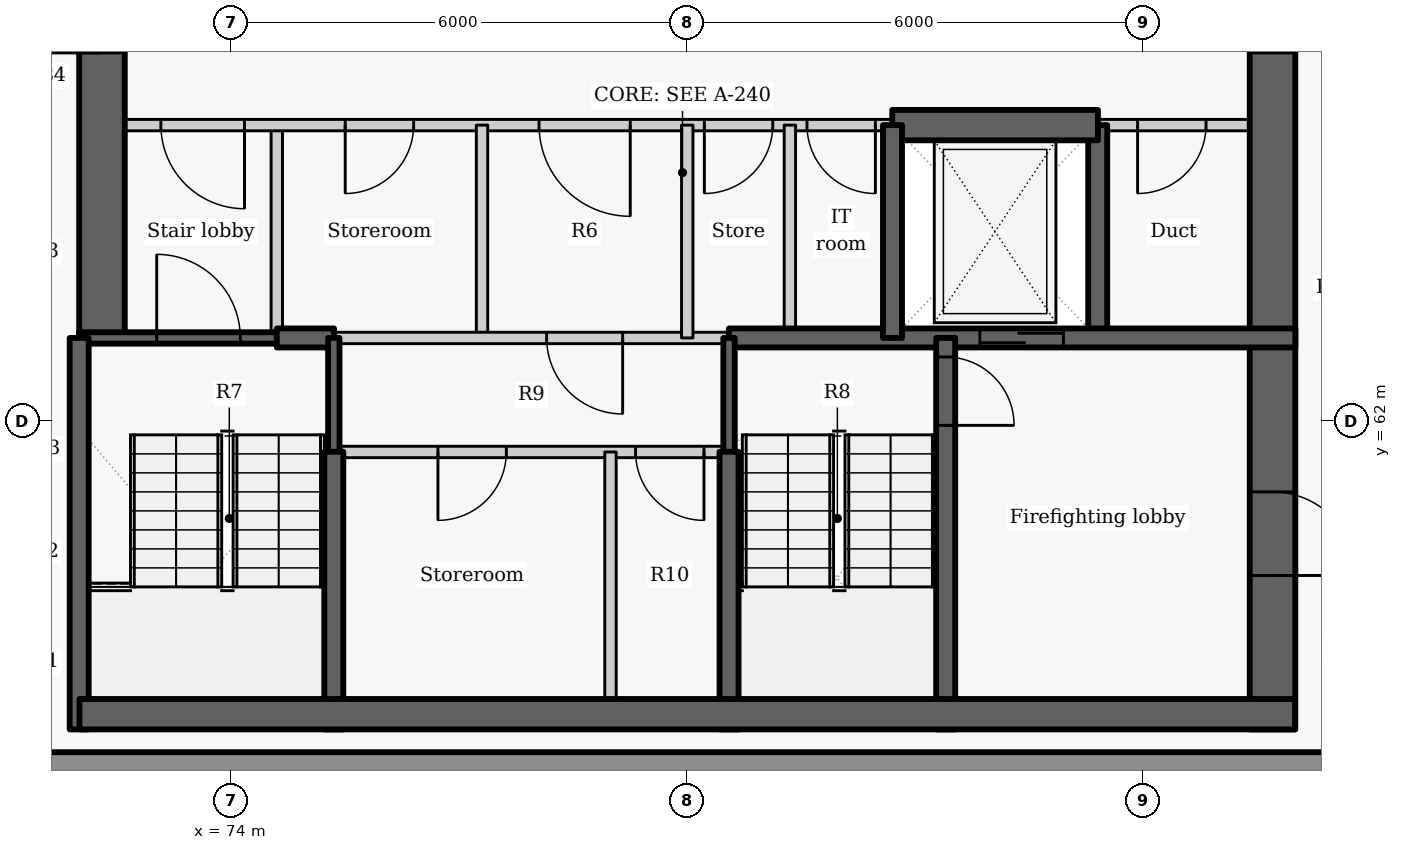
"""IFC4 building model, lengths in metres.
Left out: names, types, materials, properties, quantities, classifications, styles, units other than length and angle.
Written with IfcOpenShell. Run it as: python <this file> out.ifc"""

import sys

from ifc_helpers import new_model, si_unit, direction, frame, frame_2d, origin, place, context, subcontext, project, spatial, rectangle, extrude, element, fill, save


model = new_model("IFC4")
c1 = context("Model", 3, precision=1e-05, world=origin(), true_north=direction((0.0, 1.0)))
c2 = subcontext(c1, "Body", "Model", "MODEL_VIEW")
j1 = project(units=[si_unit("LENGTHUNIT", "METRE"), si_unit("PLANEANGLEUNIT", "RADIAN")], contexts=[c1])
p1 = place(None, origin())
s1 = spatial("IfcSite", under=j1, at=p1, CompositionType="ELEMENT")
p2 = place(p1, origin())
s2 = spatial("IfcBuilding", under=s1, at=p2, CompositionType="ELEMENT")
p3 = place(p2, frame((0.0, 0.0, 229.5)))
s3 = spatial("IfcBuildingStorey", under=s2, at=p3, CompositionType="ELEMENT", Elevation=229.5)
p4 = place(p3, frame((70.501, 57.5, 0.0), z_axis=(0.0, 0.0, 1.0), x_axis=(1.0, 0.0, 0.0)))
e1 = element("IfcWall", 1, at=p4, inside=s3, PredefinedType="SOLIDWALL", context=c2, shape_type="SweptSolid", body=[
    extrude(rectangle(XDim=18.993, YDim=0.3, at=frame_2d((9.496, 0.0))), origin(), (0.0, 0.0, 1.0), 2.425),
])
p5 = place(p3, frame((74.6, 63.1, 0.0), z_axis=(0.0, 0.0, 1.0), x_axis=(0.0, 1.0, 0.0)))
e2 = element("IfcWall", 2, at=p5, inside=s3, PredefinedType="PARTITIONING", context=c2, shape_type="SweptSolid", body=[
    extrude(rectangle(XDim=2.8, YDim=0.15, at=frame_2d((1.4, 0.0))), origin(), (0.0, 0.0, 1.0), 3.025),
])
p6 = place(p3, frame((72.3, 63.1, -0.275), z_axis=(0.0, 0.0, 1.0), x_axis=(0.0, 1.0, 0.0)))
e3 = element("IfcWall", 3, at=p6, inside=s3, PredefinedType="SHEAR", context=c2, shape_type="SweptSolid", body=[
    extrude(rectangle(XDim=9.1, YDim=0.6, at=frame_2d((4.55, 0.0))), origin(), (0.0, 0.0, 1.0), 3.3),
])
p7 = place(p6, frame((3.75, 0.0, 0.275)))
e4 = element("IfcOpeningElement", 4, at=p7, cuts=e3, PredefinedType="OPENING", context=c2, shape_type="SweptSolid", body=[
    extrude(rectangle(XDim=1.5, YDim=2.1, at=frame_2d((0.75, 1.05))), frame((0.0, 0.31, 0.0), z_axis=(0.0, -1.0, 0.0), x_axis=(1.0, 0.0, 0.0)), (0.0, 0.0, 1.0), 0.62),
])
p8 = place(p3, frame((85.4, 63.1, -0.275), z_axis=(0.0, 0.0, 1.0), x_axis=(0.0, 1.0, 0.0)))
e5 = element("IfcWall", 5, at=p8, inside=s3, PredefinedType="SHEAR", context=c2, shape_type="SweptSolid", body=[
    extrude(rectangle(XDim=2.8, YDim=0.25, at=frame_2d((1.4, 0.0))), origin(), (0.0, 0.0, 1.0), 3.3),
])
p9 = place(p3, frame((87.7, 72.2, -0.275), z_axis=(0.0, 0.0, 1.0), x_axis=(0.0, -1.0, 0.0)))
e6 = element("IfcWall", 6, at=p9, inside=s3, PredefinedType="SHEAR", context=c2, shape_type="SweptSolid", body=[
    extrude(rectangle(XDim=14.25, YDim=0.6, at=frame_2d((7.125, 0.0))), origin(), (0.0, 0.0, 1.0), 3.3),
])
p10 = place(p9, frame((3.85, 0.0, 0.275)))
e7 = element("IfcOpeningElement", 7, at=p10, cuts=e6, PredefinedType="OPENING", context=c2, shape_type="SweptSolid", body=[
    extrude(rectangle(XDim=1.5, YDim=2.1, at=frame_2d((0.75, 1.05))), frame((0.0, 0.31, 0.0), z_axis=(0.0, -1.0, 0.0), x_axis=(1.0, 0.0, 0.0)), (0.0, 0.0, 1.0), 0.62),
])
p11 = place(p9, frame((11.125, 0.0, 0.275)))
e8 = element("IfcOpeningElement", 8, at=p11, cuts=e6, PredefinedType="OPENING", context=c2, shape_type="SweptSolid", body=[
    extrude(rectangle(XDim=1.1, YDim=2.1, at=frame_2d((0.55, 1.05))), frame((0.0, 0.31, 0.0), z_axis=(0.0, -1.0, 0.0), x_axis=(1.0, 0.0, 0.0)), (0.0, 0.0, 1.0), 0.62),
])
p12 = place(p3, frame((82.703, 65.9, 0.0), z_axis=(0.0, 0.0, 1.0), x_axis=(-1.0, 0.0, 0.0)))
e9 = element("IfcWall", 9, at=p12, inside=s3, PredefinedType="PARTITIONING", context=c2, shape_type="SweptSolid", body=[
    extrude(rectangle(XDim=10.703, YDim=0.15, at=frame_2d((5.352, 0.0))), origin(), (0.0, 0.0, 1.0), 3.025),
])
p13 = place(p12, frame((8.528, 0.0, 0.0)))
e10 = element("IfcOpeningElement", 10, at=p13, cuts=e9, PredefinedType="OPENING", context=c2, shape_type="SweptSolid", body=[
    extrude(rectangle(XDim=1.1, YDim=2.1, at=frame_2d((0.55, 1.05))), frame((0.0, 0.085, 0.0), z_axis=(0.0, -1.0, 0.0), x_axis=(1.0, 0.0, 0.0)), (0.0, 0.0, 1.0), 0.17),
])
p14 = place(p12, frame((6.303, 0.0, 0.0)))
e11 = element("IfcOpeningElement", 11, at=p14, cuts=e9, PredefinedType="OPENING", context=c2, shape_type="SweptSolid", body=[
    extrude(rectangle(XDim=0.9, YDim=2.1, at=frame_2d((0.45, 1.05))), frame((0.0, 0.085, 0.0), z_axis=(0.0, -1.0, 0.0), x_axis=(1.0, 0.0, 0.0)), (0.0, 0.0, 1.0), 0.17),
])
p15 = place(p12, frame((3.453, 0.0, 0.0)))
e12 = element("IfcOpeningElement", 12, at=p15, cuts=e9, PredefinedType="OPENING", context=c2, shape_type="SweptSolid", body=[
    extrude(rectangle(XDim=1.2, YDim=2.1, at=frame_2d((0.6, 1.05))), frame((0.0, 0.085, 0.0), z_axis=(0.0, -1.0, 0.0), x_axis=(1.0, 0.0, 0.0)), (0.0, 0.0, 1.0), 0.17),
])
p16 = place(p12, frame((1.578, 0.0, 0.0)))
e13 = element("IfcOpeningElement", 13, at=p16, cuts=e9, PredefinedType="OPENING", context=c2, shape_type="SweptSolid", body=[
    extrude(rectangle(XDim=0.9, YDim=2.1, at=frame_2d((0.45, 1.05))), frame((0.0, 0.085, 0.0), z_axis=(0.0, -1.0, 0.0), x_axis=(1.0, 0.0, 0.0)), (0.0, 0.0, 1.0), 0.17),
])
p17 = place(p12, frame((0.228, 0.0, 0.0)))
e14 = element("IfcOpeningElement", 14, at=p17, cuts=e9, PredefinedType="OPENING", context=c2, shape_type="SweptSolid", body=[
    extrude(rectangle(XDim=0.9, YDim=2.1, at=frame_2d((0.45, 1.05))), frame((0.0, 0.085, 0.0), z_axis=(0.0, -1.0, 0.0), x_axis=(1.0, 0.0, 0.0)), (0.0, 0.0, 1.0), 0.17),
])
p18 = place(p3, frame((88.0, 65.9, 0.0), z_axis=(0.0, 0.0, 1.0), x_axis=(-1.0, 0.0, 0.0)))
e15 = element("IfcWall", 15, at=p18, inside=s3, PredefinedType="PARTITIONING", context=c2, shape_type="SweptSolid", body=[
    extrude(rectangle(XDim=2.603, YDim=0.15, at=frame_2d((1.302, 0.0))), origin(), (0.0, 0.0, 1.0), 3.025),
])
p19 = place(p18, frame((1.175, 0.0, 0.0)))
e16 = element("IfcOpeningElement", 16, at=p19, cuts=e15, PredefinedType="OPENING", context=c2, shape_type="SweptSolid", body=[
    extrude(rectangle(XDim=0.9, YDim=2.1, at=frame_2d((0.45, 1.05))), frame((0.0, 0.085, 0.0), z_axis=(0.0, -1.0, 0.0), x_axis=(1.0, 0.0, 0.0)), (0.0, 0.0, 1.0), 0.17),
])
p20 = place(p3, frame((82.697, 65.9, -0.275), z_axis=(0.0, 0.0, 1.0), x_axis=(1.0, 0.0, 0.0)))
e17 = element("IfcWall", 17, at=p20, inside=s3, PredefinedType="SHEAR", context=c2, shape_type="SweptSolid", body=[
    extrude(rectangle(XDim=2.706, YDim=0.4, at=frame_2d((1.353, 0.0))), origin(), (0.0, 0.0, 1.0), 3.3),
])
p21 = place(p3, frame((72.0, 63.1, -0.275), z_axis=(0.0, 0.0, 1.0), x_axis=(1.0, 0.0, 0.0)))
e18 = element("IfcWall", 18, at=p21, inside=s3, PredefinedType="SHEAR", context=c2, shape_type="SweptSolid", body=[
    extrude(rectangle(XDim=2.6, YDim=0.15, at=frame_2d((1.3, 0.0))), origin(), (0.0, 0.0, 1.0), 3.3),
])
p22 = place(p21, frame((1.02, 0.0, 0.275)))
e19 = element("IfcOpeningElement", 19, at=p22, cuts=e18, PredefinedType="OPENING", context=c2, shape_type="SweptSolid", body=[
    extrude(rectangle(XDim=1.1, YDim=2.1, at=frame_2d((0.55, 1.05))), frame((0.0, 0.085, 0.0), z_axis=(0.0, -1.0, 0.0), x_axis=(1.0, 0.0, 0.0)), (0.0, 0.0, 1.0), 0.17),
])
p23 = place(p3, frame((77.3, 63.1, 0.0), z_axis=(0.0, 0.0, 1.0), x_axis=(0.0, 1.0, 0.0)))
e20 = element("IfcWall", 20, at=p23, inside=s3, PredefinedType="PARTITIONING", context=c2, shape_type="SweptSolid", body=[
    extrude(rectangle(XDim=2.8, YDim=0.15, at=frame_2d((1.4, 0.0))), origin(), (0.0, 0.0, 1.0), 3.025),
])
p24 = place(p3, frame((74.6, 63.1, -0.275), z_axis=(0.0, 0.0, 1.0), x_axis=(1.0, 0.0, 0.0)))
e21 = element("IfcWall", 21, at=p24, inside=s3, PredefinedType="SHEAR", context=c2, shape_type="SweptSolid", body=[
    extrude(rectangle(XDim=0.753, YDim=0.25, at=frame_2d((0.376, 0.0))), origin(), (0.0, 0.0, 1.0), 3.3),
])
p25 = place(p3, frame((80.547, 63.1, -0.275), z_axis=(0.0, 0.0, 1.0), x_axis=(1.0, 0.0, 0.0)))
e22 = element("IfcWall", 22, at=p25, inside=s3, PredefinedType="SHEAR", context=c2, shape_type="SweptSolid", body=[
    extrude(rectangle(XDim=7.453, YDim=0.25, at=frame_2d((3.727, 0.0))), origin(), (0.0, 0.0, 1.0), 3.3),
])
p26 = place(p25, frame((3.302, 0.0, 0.275)))
e23 = element("IfcOpeningElement", 23, at=p26, cuts=e22, PredefinedType="OPENING", context=c2, shape_type="SweptSolid", body=[
    extrude(rectangle(XDim=1.1, YDim=2.1, at=frame_2d((0.55, 1.05))), frame((0.0, 0.135, 0.0), z_axis=(0.0, -1.0, 0.0), x_axis=(1.0, 0.0, 0.0)), (0.0, 0.0, 1.0), 0.27),
])
p27 = place(p3, frame((80.553, 63.1, 0.0), z_axis=(0.0, 0.0, 1.0), x_axis=(-1.0, 0.0, 0.0)))
e24 = element("IfcWall", 24, at=p27, inside=s3, PredefinedType="PARTITIONING", context=c2, shape_type="SweptSolid", body=[
    extrude(rectangle(XDim=5.206, YDim=0.15, at=frame_2d((2.603, 0.0))), origin(), (0.0, 0.0, 1.0), 3.025),
])
p28 = place(p27, frame((1.403, 0.0, 0.0)))
e25 = element("IfcOpeningElement", 25, at=p28, cuts=e24, PredefinedType="OPENING", context=c2, shape_type="SweptSolid", body=[
    extrude(rectangle(XDim=1.0, YDim=2.1, at=frame_2d((0.5, 1.05))), frame((0.0, 0.085, 0.0), z_axis=(0.0, -1.0, 0.0), x_axis=(1.0, 0.0, 0.0)), (0.0, 0.0, 1.0), 0.17),
])
for number, where, z_axis, x_axis in (
    (26, (80.0, 63.1, 0.0), (0.0, 0.0, 1.0), (0.0, 1.0, 0.0)),
    (27, (81.35, 63.1, 0.0), (0.0, 0.0, 1.0), (0.0, 1.0, 0.0)),
):
    element("IfcWall", number, at=place(p3, frame(where, z_axis=z_axis, x_axis=x_axis)), inside=s3, PredefinedType="PARTITIONING", context=c2, shape_type="SweptSolid", body=[
        extrude(rectangle(XDim=2.8, YDim=0.15, at=frame_2d((1.4, 0.0))), origin(), (0.0, 0.0, 1.0), 3.025),
    ])
p29 = place(p3, frame((82.7, 63.1, -0.275), z_axis=(0.0, 0.0, 1.0), x_axis=(0.0, 1.0, 0.0)))
e28 = element("IfcWall", 28, at=p29, inside=s3, PredefinedType="SHEAR", context=c2, shape_type="SweptSolid", body=[
    extrude(rectangle(XDim=2.8, YDim=0.25, at=frame_2d((1.4, 0.0))), origin(), (0.0, 0.0, 1.0), 3.3),
])
p30 = place(p3, frame((75.35, 61.597, -0.275), z_axis=(0.0, 0.0, 1.0), x_axis=(0.0, 1.0, 0.0)))
e29 = element("IfcWall", 29, at=p30, inside=s3, PredefinedType="SHEAR", context=c2, shape_type="SweptSolid", body=[
    extrude(rectangle(XDim=1.503, YDim=0.15, at=frame_2d((0.751, 0.0))), origin(), (0.0, 0.0, 1.0), 3.3),
])
p31 = place(p3, frame((75.35, 57.95, -0.275), z_axis=(0.0, 0.0, 1.0), x_axis=(0.0, 1.0, 0.0)))
e30 = element("IfcWall", 30, at=p31, inside=s3, PredefinedType="SHEAR", context=c2, shape_type="SweptSolid", body=[
    extrude(rectangle(XDim=3.653, YDim=0.25, at=frame_2d((1.827, 0.0))), origin(), (0.0, 0.0, 1.0), 3.3),
])
p32 = place(p3, frame((72.0, 57.95, -0.275), z_axis=(0.0, 0.0, 1.0), x_axis=(0.0, 1.0, 0.0)))
e31 = element("IfcWall", 31, at=p32, inside=s3, PredefinedType="SHEAR", context=c2, shape_type="SweptSolid", body=[
    extrude(rectangle(XDim=5.15, YDim=0.25, at=frame_2d((2.575, 0.0))), origin(), (0.0, 0.0, 1.0), 3.3),
])
p33 = place(p3, frame((83.4, 63.1, -0.275), z_axis=(0.0, 0.0, 1.0), x_axis=(0.0, -1.0, 0.0)))
e32 = element("IfcWall", 32, at=p33, inside=s3, PredefinedType="SHEAR", context=c2, shape_type="SweptSolid", body=[
    extrude(rectangle(XDim=5.15, YDim=0.25, at=frame_2d((2.575, 0.0))), origin(), (0.0, 0.0, 1.0), 3.3),
])
p34 = place(p33, frame((0.25, 0.0, 0.275)))
e33 = element("IfcOpeningElement", 33, at=p34, cuts=e32, PredefinedType="OPENING", context=c2, shape_type="SweptSolid", body=[
    extrude(rectangle(XDim=0.9, YDim=2.1, at=frame_2d((0.45, 1.05))), frame((0.0, 0.135, 0.0), z_axis=(0.0, -1.0, 0.0), x_axis=(1.0, 0.0, 0.0)), (0.0, 0.0, 1.0), 0.27),
])
p35 = place(p3, frame((80.55, 61.597, -0.275), z_axis=(0.0, 0.0, 1.0), x_axis=(0.0, 1.0, 0.0)))
e34 = element("IfcWall", 34, at=p35, inside=s3, PredefinedType="SHEAR", context=c2, shape_type="SweptSolid", body=[
    extrude(rectangle(XDim=1.503, YDim=0.15, at=frame_2d((0.751, 0.0))), origin(), (0.0, 0.0, 1.0), 3.3),
])
p36 = place(p3, frame((80.55, 57.95, -0.275), z_axis=(0.0, 0.0, 1.0), x_axis=(0.0, 1.0, 0.0)))
e35 = element("IfcWall", 35, at=p36, inside=s3, PredefinedType="SHEAR", context=c2, shape_type="SweptSolid", body=[
    extrude(rectangle(XDim=3.653, YDim=0.25, at=frame_2d((1.827, 0.0))), origin(), (0.0, 0.0, 1.0), 3.3),
])
p37 = place(p3, frame((80.55, 61.6, 0.0), z_axis=(0.0, 0.0, 1.0), x_axis=(-1.0, 0.0, 0.0)))
e36 = element("IfcWall", 36, at=p37, inside=s3, PredefinedType="PARTITIONING", context=c2, shape_type="SweptSolid", body=[
    extrude(rectangle(XDim=5.2, YDim=0.15, at=frame_2d((2.6, 0.0))), origin(), (0.0, 0.0, 1.0), 3.025),
])
p38 = place(p37, frame((2.93, 0.0, 0.0)))
e37 = element("IfcOpeningElement", 37, at=p38, cuts=e36, PredefinedType="OPENING", context=c2, shape_type="SweptSolid", body=[
    extrude(rectangle(XDim=0.9, YDim=2.1, at=frame_2d((0.45, 1.05))), frame((0.0, 0.085, 0.0), z_axis=(0.0, -1.0, 0.0), x_axis=(1.0, 0.0, 0.0)), (0.0, 0.0, 1.0), 0.17),
])
p39 = place(p37, frame((0.33, 0.0, 0.0)))
e38 = element("IfcOpeningElement", 38, at=p39, cuts=e36, PredefinedType="OPENING", context=c2, shape_type="SweptSolid", body=[
    extrude(rectangle(XDim=0.9, YDim=2.1, at=frame_2d((0.45, 1.05))), frame((0.0, 0.085, 0.0), z_axis=(0.0, -1.0, 0.0), x_axis=(1.0, 0.0, 0.0)), (0.0, 0.0, 1.0), 0.17),
])
p40 = place(p3, frame((78.99, 57.95, 0.0), z_axis=(0.0, 0.0, 1.0), x_axis=(0.0, 1.0, 0.0)))
e39 = element("IfcWall", 39, at=p40, inside=s3, PredefinedType="PARTITIONING", context=c2, shape_type="SweptSolid", body=[
    extrude(rectangle(XDim=3.65, YDim=0.15, at=frame_2d((1.825, 0.0))), origin(), (0.0, 0.0, 1.0), 3.025),
])
p41 = place(p3, frame((72.004, 58.15, -0.275), z_axis=(0.0, 0.0, 1.0), x_axis=(1.0, 0.0, 0.0)))
e40 = element("IfcWall", 40, at=p41, inside=s3, PredefinedType="SHEAR", context=c2, shape_type="SweptSolid", body=[
    extrude(rectangle(XDim=15.992, YDim=0.4, at=frame_2d((7.996, 0.0))), origin(), (0.0, 0.0, 1.0), 3.3),
])
p42 = place(p13, origin())
e41 = element("IfcDoor", 41, at=p42, inside=s3, OperationType="SINGLE_SWING_LEFT", PredefinedType="DOOR", context=c2, shape_type="SweptSolid", body=[
    extrude(rectangle(XDim=1.1, YDim=2.1, at=frame_2d((0.55, 1.05))), frame((0.0, 0.025, 0.0), z_axis=(0.0, -1.0, 0.0), x_axis=(1.0, 0.0, 0.0)), (0.0, 0.0, 1.0), 0.05),
])
fill(e10, e41)
p43 = place(p14, origin())
e42 = element("IfcDoor", 42, at=p43, inside=s3, OperationType="SINGLE_SWING_RIGHT", PredefinedType="DOOR", context=c2, shape_type="SweptSolid", body=[
    extrude(rectangle(XDim=0.9, YDim=2.1, at=frame_2d((0.45, 1.05))), frame((0.0, 0.025, 0.0), z_axis=(0.0, -1.0, 0.0), x_axis=(1.0, 0.0, 0.0)), (0.0, 0.0, 1.0), 0.05),
])
fill(e11, e42)
p44 = place(p15, origin())
e43 = element("IfcDoor", 43, at=p44, inside=s3, OperationType="DOUBLE_DOOR_SINGLE_SWING", PredefinedType="DOOR", context=c2, shape_type="SweptSolid", body=[
    extrude(rectangle(XDim=1.2, YDim=2.1, at=frame_2d((0.6, 1.05))), frame((0.0, 0.025, 0.0), z_axis=(0.0, -1.0, 0.0), x_axis=(1.0, 0.0, 0.0)), (0.0, 0.0, 1.0), 0.05),
])
fill(e12, e43)
p45 = place(p16, origin())
e44 = element("IfcDoor", 44, at=p45, inside=s3, OperationType="SINGLE_SWING_RIGHT", PredefinedType="DOOR", context=c2, shape_type="SweptSolid", body=[
    extrude(rectangle(XDim=0.9, YDim=2.1, at=frame_2d((0.45, 1.05))), frame((0.0, 0.025, 0.0), z_axis=(0.0, -1.0, 0.0), x_axis=(1.0, 0.0, 0.0)), (0.0, 0.0, 1.0), 0.05),
])
fill(e13, e44)
p46 = place(p17, origin())
e45 = element("IfcDoor", 45, at=p46, inside=s3, OperationType="SINGLE_SWING_LEFT", PredefinedType="DOOR", context=c2, shape_type="SweptSolid", body=[
    extrude(rectangle(XDim=0.9, YDim=2.1, at=frame_2d((0.45, 1.05))), frame((0.0, 0.025, 0.0), z_axis=(0.0, -1.0, 0.0), x_axis=(1.0, 0.0, 0.0)), (0.0, 0.0, 1.0), 0.05),
])
fill(e14, e45)
p47 = place(p26, origin())
e46 = element("IfcDoor", 46, at=p47, inside=s3, OperationType="SLIDING_TO_LEFT", PredefinedType="DOOR", context=c2, shape_type="SweptSolid", body=[
    extrude(rectangle(XDim=1.1, YDim=2.1, at=frame_2d((0.55, 1.05))), frame((0.0, 0.025, 0.0), z_axis=(0.0, -1.0, 0.0), x_axis=(1.0, 0.0, 0.0)), (0.0, 0.0, 1.0), 0.05),
])
fill(e23, e46)
p48 = place(p19, origin())
e47 = element("IfcDoor", 47, at=p48, inside=s3, OperationType="SINGLE_SWING_RIGHT", PredefinedType="DOOR", context=c2, shape_type="SweptSolid", body=[
    extrude(rectangle(XDim=0.9, YDim=2.1, at=frame_2d((0.45, 1.05))), frame((0.0, 0.025, 0.0), z_axis=(0.0, -1.0, 0.0), x_axis=(1.0, 0.0, 0.0)), (0.0, 0.0, 1.0), 0.05),
])
fill(e16, e47)
p49 = place(p28, origin())
e48 = element("IfcDoor", 48, at=p49, inside=s3, OperationType="SINGLE_SWING_LEFT", PredefinedType="DOOR", context=c2, shape_type="SweptSolid", body=[
    extrude(rectangle(XDim=1.0, YDim=2.1, at=frame_2d((0.5, 1.05))), frame((0.0, 0.025, 0.0), z_axis=(0.0, -1.0, 0.0), x_axis=(1.0, 0.0, 0.0)), (0.0, 0.0, 1.0), 0.05),
])
fill(e25, e48)
p50 = place(p38, origin())
e49 = element("IfcDoor", 49, at=p50, inside=s3, OperationType="SINGLE_SWING_RIGHT", PredefinedType="DOOR", context=c2, shape_type="SweptSolid", body=[
    extrude(rectangle(XDim=0.9, YDim=2.1, at=frame_2d((0.45, 1.05))), frame((0.0, 0.025, 0.0), z_axis=(0.0, -1.0, 0.0), x_axis=(1.0, 0.0, 0.0)), (0.0, 0.0, 1.0), 0.05),
])
fill(e37, e49)
p51 = place(p39, origin())
e50 = element("IfcDoor", 50, at=p51, inside=s3, OperationType="SINGLE_SWING_LEFT", PredefinedType="DOOR", context=c2, shape_type="SweptSolid", body=[
    extrude(rectangle(XDim=0.9, YDim=2.1, at=frame_2d((0.45, 1.05))), frame((0.0, 0.025, 0.0), z_axis=(0.0, -1.0, 0.0), x_axis=(1.0, 0.0, 0.0)), (0.0, 0.0, 1.0), 0.05),
])
fill(e38, e50)
p52 = place(p22, origin())
e51 = element("IfcDoor", 51, at=p52, inside=s3, OperationType="SINGLE_SWING_LEFT", PredefinedType="DOOR", context=c2, shape_type="SweptSolid", body=[
    extrude(rectangle(XDim=1.1, YDim=2.1, at=frame_2d((0.55, 1.05))), frame((0.0, 0.025, 0.0), z_axis=(0.0, -1.0, 0.0), x_axis=(1.0, 0.0, 0.0)), (0.0, 0.0, 1.0), 0.05),
])
fill(e19, e51)
p53 = place(p34, origin())
e52 = element("IfcDoor", 52, at=p53, inside=s3, OperationType="SINGLE_SWING_RIGHT", PredefinedType="DOOR", context=c2, shape_type="SweptSolid", body=[
    extrude(rectangle(XDim=0.9, YDim=2.1, at=frame_2d((0.45, 1.05))), frame((0.0, 0.025, 0.0), z_axis=(0.0, -1.0, 0.0), x_axis=(1.0, 0.0, 0.0)), (0.0, 0.0, 1.0), 0.05),
])
fill(e33, e52)
p54 = place(p10, origin())
e53 = element("IfcDoor", 53, at=p54, inside=s3, OperationType="DOUBLE_DOOR_SINGLE_SWING", PredefinedType="DOOR", context=c2, shape_type="SweptSolid", body=[
    extrude(rectangle(XDim=1.5, YDim=2.1, at=frame_2d((0.75, 1.05))), frame((0.0, 0.025, 0.0), z_axis=(0.0, -1.0, 0.0), x_axis=(1.0, 0.0, 0.0)), (0.0, 0.0, 1.0), 0.05),
])
fill(e7, e53)
p55 = place(p11, origin())
e54 = element("IfcDoor", 54, at=p55, inside=s3, OperationType="SINGLE_SWING_RIGHT", PredefinedType="DOOR", context=c2, shape_type="SweptSolid", body=[
    extrude(rectangle(XDim=1.1, YDim=2.1, at=frame_2d((0.55, 1.05))), frame((0.0, 0.025, 0.0), z_axis=(0.0, -1.0, 0.0), x_axis=(1.0, 0.0, 0.0)), (0.0, 0.0, 1.0), 0.05),
])
fill(e8, e54)
save(model, sys.argv[1])
